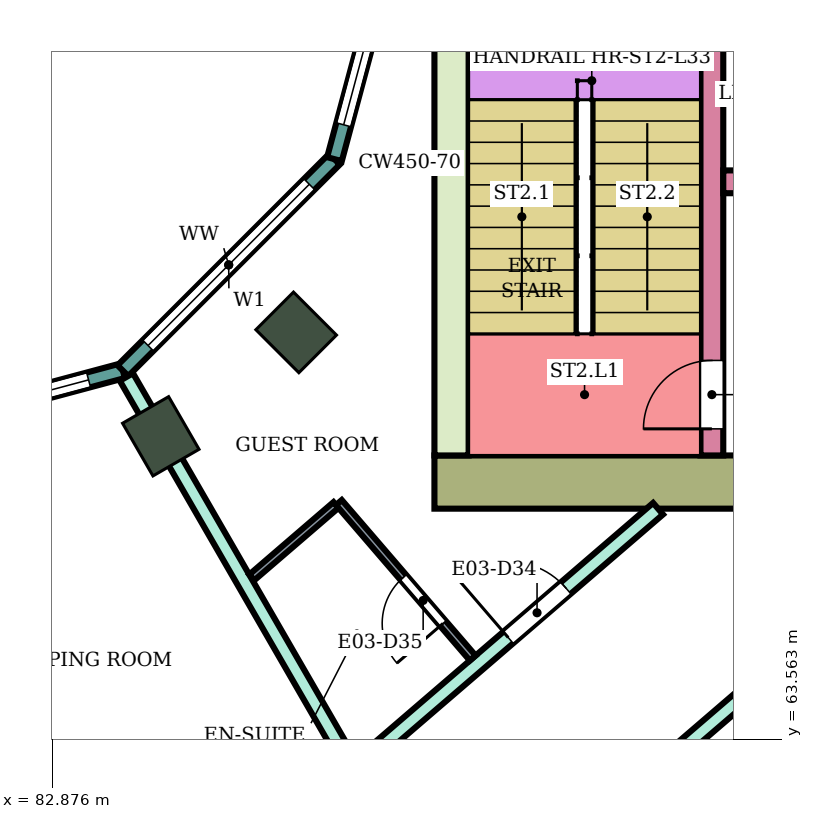
"""IFC4 building model, lengths in metres.
Left out: names, types, materials, properties, quantities, classifications, styles, units other than length and angle.
Written with IfcOpenShell. Run it as: python <this file> out.ifc"""

import sys

from ifc_helpers import new_model, si_unit, direction, frame, frame_2d, origin, origin_2d, place, context, subcontext, project, spatial, rectangle, extrude, element, fill, save


model = new_model("IFC4")
c1 = context("Model", 3, precision=1e-05, world=origin(), true_north=direction((0.0, 1.0)))
c2 = subcontext(c1, "Body", "Model", "MODEL_VIEW")
j1 = project(units=[si_unit("LENGTHUNIT", "METRE"), si_unit("PLANEANGLEUNIT", "RADIAN")], contexts=[c1])
p1 = place(None, origin())
s1 = spatial("IfcSite", under=j1, at=p1, CompositionType="ELEMENT")
p2 = place(p1, origin())
s2 = spatial("IfcBuilding", under=s1, at=p2, CompositionType="ELEMENT")
p3 = place(p2, frame((0.0, 0.0, 141.9)))
s3 = spatial("IfcBuildingStorey", under=s2, at=p3, CompositionType="ELEMENT", Elevation=141.9)
for number, where, z_axis, x_axis in (
    (1, (84.3, 67.552, 0.0), (0.0, 0.0, 1.0), (0.5, -0.866, 0.0)),
    (2, (86.081, 68.919, 0.0), (0.0, 0.0, 1.0), (0.707, -0.707, 0.0)),
):
    element("IfcColumn", number, at=place(p3, frame(where, z_axis=z_axis, x_axis=x_axis)), inside=s3, PredefinedType="COLUMN", context=c2, shape_type="SweptSolid", body=[
        extrude(rectangle(XDim=0.8, YDim=0.7, at=origin_2d()), origin(), (0.0, 0.0, 1.0), 3.9),
    ])
p4 = place(p3, frame((87.9, 66.95, 0.0), z_axis=(0.0, 0.0, 1.0), x_axis=(1.0, 0.0, 0.0)))
e3 = element("IfcWall", 3, at=p4, inside=s3, PredefinedType="SHEAR", context=c2, shape_type="SweptSolid", body=[
    extrude(rectangle(XDim=14.8, YDim=0.7, at=frame_2d((7.4, 0.0))), origin(), (0.0, 0.0, 1.0), 3.58),
])
p5 = place(p4, frame((4.2, 0.0, 0.0)))
e4 = element("IfcOpeningElement", 4, at=p5, cuts=e3, PredefinedType="OPENING", context=c2, shape_type="SweptSolid", body=[
    extrude(rectangle(XDim=2.4, YDim=2.4, at=frame_2d((1.2, 1.2))), frame((0.0, 0.36, 0.0), z_axis=(0.0, -1.0, 0.0), x_axis=(1.0, 0.0, 0.0)), (0.0, 0.0, 1.0), 0.72),
])
p6 = place(p3, frame((88.125, 67.3, 0.0), z_axis=(0.0, 0.0, 1.0), x_axis=(0.0, 1.0, 0.0)))
e5 = element("IfcWall", 5, at=p6, inside=s3, PredefinedType="SHEAR", context=c2, shape_type="SweptSolid", body=[
    extrude(rectangle(XDim=7.7, YDim=0.45, at=frame_2d((3.85, 0.0))), origin(), (0.0, 0.0, 1.0), 3.58),
])
p7 = place(p3, frame((91.55, 67.3, 0.0), z_axis=(0.0, 0.0, 1.0), x_axis=(0.0, 1.0, 0.0)))
e6 = element("IfcWall", 6, at=p7, inside=s3, PredefinedType="SHEAR", context=c2, shape_type="SweptSolid", body=[
    extrude(rectangle(XDim=7.7, YDim=0.3, at=frame_2d((3.85, 0.0))), origin(), (0.0, 0.0, 1.0), 3.58),
])
p8 = place(p7, frame((0.35, 0.0, 0.0)))
e7 = element("IfcOpeningElement", 7, at=p8, cuts=e6, PredefinedType="OPENING", context=c2, shape_type="SweptSolid", body=[
    extrude(rectangle(XDim=0.9, YDim=2.1, at=frame_2d((0.45, 1.05))), frame((0.0, 0.16, 0.0), z_axis=(0.0, -1.0, 0.0), x_axis=(1.0, 0.0, 0.0)), (0.0, 0.0, 1.0), 0.32),
])
p9 = place(p3, frame((91.7, 70.9, 0.0), z_axis=(0.0, 0.0, 1.0), x_axis=(1.0, 0.0, 0.0)))
e8 = element("IfcWall", 8, at=p9, inside=s3, PredefinedType="SHEAR", context=c2, shape_type="SweptSolid", body=[
    extrude(rectangle(XDim=11.0, YDim=0.3, at=frame_2d((5.5, 0.0))), origin(), (0.0, 0.0, 1.0), 3.58),
])
p10 = place(p9, frame((0.4, 0.0, 0.0)))
e9 = element("IfcOpeningElement", 9, at=p10, cuts=e8, PredefinedType="OPENING", context=c2, shape_type="SweptSolid", body=[
    extrude(rectangle(XDim=1.4, YDim=2.1, at=frame_2d((0.7, 1.05))), frame((0.0, 0.16, 0.0), z_axis=(0.0, -1.0, 0.0), x_axis=(1.0, 0.0, 0.0)), (0.0, 0.0, 1.0), 0.32),
])
p11 = place(p9, frame((5.4, 0.0, 0.0)))
e10 = element("IfcOpeningElement", 10, at=p11, cuts=e8, PredefinedType="OPENING", context=c2, shape_type="SweptSolid", body=[
    extrude(rectangle(XDim=1.4, YDim=2.1, at=frame_2d((0.7, 1.05))), frame((0.0, 0.16, 0.0), z_axis=(0.0, -1.0, 0.0), x_axis=(1.0, 0.0, 0.0)), (0.0, 0.0, 1.0), 0.32),
])
p12 = place(p9, frame((8.1, 0.0, 0.0)))
e11 = element("IfcOpeningElement", 11, at=p12, cuts=e8, PredefinedType="OPENING", context=c2, shape_type="SweptSolid", body=[
    extrude(rectangle(XDim=1.0, YDim=2.1, at=frame_2d((0.5, 1.05))), frame((0.0, 0.16, 0.0), z_axis=(0.0, -1.0, 0.0), x_axis=(1.0, 0.0, 0.0)), (0.0, 0.0, 1.0), 0.32),
])
p13 = place(p3, frame((80.0, 67.396, 0.0), z_axis=(0.0, 0.0, 1.0), x_axis=(0.965933654434, 0.258789828301, 0.0)))
e12 = element("IfcWall", 12, at=p13, inside=s3, PredefinedType="NOTDEFINED", context=c2, shape_type="SweptSolid", body=[
    extrude(rectangle(XDim=3.936, YDim=0.2, at=frame_2d((1.968, 0.0))), origin(), (0.0, 0.0, 1.0), 3.9),
])
p14 = place(p13, frame((0.468, 0.0, 0.9)))
e13 = element("IfcOpeningElement", 13, at=p14, cuts=e12, PredefinedType="OPENING", context=c2, shape_type="SweptSolid", body=[
    extrude(rectangle(XDim=3.0, YDim=2.3, at=frame_2d((1.5, 1.15))), frame((0.0, 0.11, 0.0), z_axis=(0.0, -1.0, 0.0), x_axis=(1.0, 0.0, 0.0)), (0.0, 0.0, 1.0), 0.22),
])
p15 = place(p3, frame((83.802, 68.415, 0.0), z_axis=(0.0, 0.0, 1.0), x_axis=(0.707106781187, 0.707106781187, 0.0)))
e14 = element("IfcWall", 14, at=p15, inside=s3, PredefinedType="NOTDEFINED", context=c2, shape_type="SweptSolid", body=[
    extrude(rectangle(XDim=3.936, YDim=0.2, at=frame_2d((1.968, 0.0))), origin(), (0.0, 0.0, 1.0), 3.9),
])
p16 = place(p15, frame((0.468, 0.0, 0.9)))
e15 = element("IfcOpeningElement", 15, at=p16, cuts=e14, PredefinedType="OPENING", context=c2, shape_type="SweptSolid", body=[
    extrude(rectangle(XDim=3.0, YDim=2.3, at=frame_2d((1.5, 1.15))), frame((0.0, 0.11, 0.0), z_axis=(0.0, -1.0, 0.0), x_axis=(1.0, 0.0, 0.0)), (0.0, 0.0, 1.0), 0.22),
])
p17 = place(p3, frame((86.585, 71.198, 0.0), z_axis=(0.0, 0.0, 1.0), x_axis=(0.258789828301, 0.965933654434, 0.0)))
e16 = element("IfcWall", 16, at=p17, inside=s3, PredefinedType="NOTDEFINED", context=c2, shape_type="SweptSolid", body=[
    extrude(rectangle(XDim=3.936, YDim=0.2, at=frame_2d((1.968, 0.0))), origin(), (0.0, 0.0, 1.0), 3.9),
])
p18 = place(p17, frame((0.468, 0.0, 0.9)))
e17 = element("IfcOpeningElement", 17, at=p18, cuts=e16, PredefinedType="OPENING", context=c2, shape_type="SweptSolid", body=[
    extrude(rectangle(XDim=3.0, YDim=2.3, at=frame_2d((1.5, 1.15))), frame((0.0, 0.11, 0.0), z_axis=(0.0, -1.0, 0.0), x_axis=(1.0, 0.0, 0.0)), (0.0, 0.0, 1.0), 0.22),
])
p19 = place(p3, frame((83.847, 68.332, 0.0), z_axis=(0.0, 0.0, 1.0), x_axis=(0.499901724708, -0.866082135617, 0.0)))
e18 = element("IfcWall", 18, at=p19, inside=s3, PredefinedType="PARTITIONING", context=c2, shape_type="SweptSolid", body=[
    extrude(rectangle(XDim=5.855, YDim=0.2, at=frame_2d((2.928, 0.0))), origin(), (0.0, 0.0, 1.0), 3.45),
])
p20 = place(p3, frame((86.877, 63.189, 0.0), z_axis=(0.0, 0.0, 1.0), x_axis=(0.758164888471, 0.652062881853, 0.0)))
e19 = element("IfcWall", 19, at=p20, inside=s3, PredefinedType="PARTITIONING", context=c2, shape_type="SweptSolid", body=[
    extrude(rectangle(XDim=5.23, YDim=0.2, at=frame_2d((2.615, 0.0))), origin(), (0.0, 0.0, 1.0), 3.45),
])
p21 = place(p20, frame((2.63, 0.0, 0.0)))
e20 = element("IfcOpeningElement", 20, at=p21, cuts=e19, PredefinedType="OPENING", context=c2, shape_type="SweptSolid", body=[
    extrude(rectangle(XDim=1.0, YDim=2.1, at=frame_2d((0.5, 1.05))), frame((0.0, 0.11, 0.0), z_axis=(0.0, -1.0, 0.0), x_axis=(1.0, 0.0, 0.0)), (0.0, 0.0, 1.0), 0.22),
])
p22 = place(p3, frame((88.123, 60.831, 0.0), z_axis=(0.0, 0.0, 1.0), x_axis=(0.758118199374, 0.652117164149, 0.0)))
e21 = element("IfcWall", 21, at=p22, inside=s3, PredefinedType="PARTITIONING", context=c2, shape_type="SweptSolid", body=[
    extrude(rectangle(XDim=6.486, YDim=0.2, at=frame_2d((3.243, 0.0))), origin(), (0.0, 0.0, 1.0), 3.45),
])
p23 = place(p22, frame((2.073, 0.0, 0.0)))
e22 = element("IfcOpeningElement", 22, at=p23, cuts=e21, PredefinedType="OPENING", context=c2, shape_type="SweptSolid", body=[
    extrude(rectangle(XDim=1.8, YDim=2.1, at=frame_2d((0.9, 1.05))), frame((0.0, 0.11, 0.0), z_axis=(0.0, -1.0, 0.0), x_axis=(1.0, 0.0, 0.0)), (0.0, 0.0, 1.0), 0.22),
])
p24 = place(p3, frame((85.497, 65.696, 0.0), z_axis=(0.0, 0.0, 1.0), x_axis=(0.75817032582, 0.652056559698, 0.0)))
e23 = element("IfcWall", 23, at=p24, inside=s3, PredefinedType="PARTITIONING", context=c2, shape_type="SweptSolid", body=[
    extrude(rectangle(XDim=1.461, YDim=0.1, at=frame_2d((0.73, 0.0))), origin(), (0.0, 0.0, 1.0), 3.45),
])
p25 = place(p3, frame((86.643, 66.681, 0.0), z_axis=(0.0, 0.0, 1.0), x_axis=(0.652264876065, -0.757991115682, 0.0)))
e24 = element("IfcWall", 24, at=p25, inside=s3, PredefinedType="PARTITIONING", context=c2, shape_type="SweptSolid", body=[
    extrude(rectangle(XDim=2.699, YDim=0.1, at=frame_2d((1.35, 0.0))), origin(), (0.0, 0.0, 1.0), 3.45),
])
p26 = place(p25, frame((1.3, 0.0, 0.0)))
e25 = element("IfcOpeningElement", 25, at=p26, cuts=e24, PredefinedType="OPENING", context=c2, shape_type="SweptSolid", body=[
    extrude(rectangle(XDim=0.8, YDim=2.1, at=frame_2d((0.4, 1.05))), frame((0.0, 0.06, 0.0), z_axis=(0.0, -1.0, 0.0), x_axis=(1.0, 0.0, 0.0)), (0.0, 0.0, 1.0), 0.12),
])
p27 = place(p14, origin())
e26 = element("IfcWindow", 26, at=p27, inside=s3, PartitioningType="SINGLE_PANEL", PredefinedType="WINDOW", context=c2, shape_type="SweptSolid", body=[
    extrude(rectangle(XDim=3.0, YDim=2.3, at=frame_2d((1.5, 1.15))), frame((0.0, 0.03, 0.0), z_axis=(0.0, -1.0, 0.0), x_axis=(1.0, 0.0, 0.0)), (0.0, 0.0, 1.0), 0.06),
])
fill(e13, e26)
p28 = place(p16, origin())
e27 = element("IfcWindow", 27, at=p28, inside=s3, PartitioningType="SINGLE_PANEL", PredefinedType="WINDOW", context=c2, shape_type="SweptSolid", body=[
    extrude(rectangle(XDim=3.0, YDim=2.3, at=frame_2d((1.5, 1.15))), frame((0.0, 0.03, 0.0), z_axis=(0.0, -1.0, 0.0), x_axis=(1.0, 0.0, 0.0)), (0.0, 0.0, 1.0), 0.06),
])
fill(e15, e27)
p29 = place(p18, origin())
e28 = element("IfcWindow", 28, at=p29, inside=s3, PartitioningType="SINGLE_PANEL", PredefinedType="WINDOW", context=c2, shape_type="SweptSolid", body=[
    extrude(rectangle(XDim=3.0, YDim=2.3, at=frame_2d((1.5, 1.15))), frame((0.0, 0.03, 0.0), z_axis=(0.0, -1.0, 0.0), x_axis=(1.0, 0.0, 0.0)), (0.0, 0.0, 1.0), 0.06),
])
fill(e17, e28)
p30 = place(p21, origin())
e29 = element("IfcDoor", 29, at=p30, inside=s3, OperationType="SINGLE_SWING_LEFT", PredefinedType="DOOR", context=c2, shape_type="SweptSolid", body=[
    extrude(rectangle(XDim=1.0, YDim=2.1, at=frame_2d((0.5, 1.05))), frame((0.0, 0.025, 0.0), z_axis=(0.0, -1.0, 0.0), x_axis=(1.0, 0.0, 0.0)), (0.0, 0.0, 1.0), 0.05),
])
fill(e20, e29)
p31 = place(p26, frame((0.8, 0.0, 0.0), z_axis=(0.0, 0.0, 1.0), x_axis=(-1.0, 0.0, 0.0)))
e30 = element("IfcDoor", 30, at=p31, inside=s3, OperationType="SINGLE_SWING_LEFT", PredefinedType="DOOR", context=c2, shape_type="SweptSolid", body=[
    extrude(rectangle(XDim=0.8, YDim=2.1, at=frame_2d((0.4, 1.05))), frame((0.0, 0.025, 0.0), z_axis=(0.0, -1.0, 0.0), x_axis=(1.0, 0.0, 0.0)), (0.0, 0.0, 1.0), 0.05),
])
fill(e25, e30)
p32 = place(p8, origin())
e31 = element("IfcDoor", 31, at=p32, inside=s3, OperationType="SINGLE_SWING_LEFT", PredefinedType="DOOR", context=c2, shape_type="SweptSolid", body=[
    extrude(rectangle(XDim=0.9, YDim=2.1, at=frame_2d((0.45, 1.05))), frame((0.0, 0.025, 0.0), z_axis=(0.0, -1.0, 0.0), x_axis=(1.0, 0.0, 0.0)), (0.0, 0.0, 1.0), 0.05),
])
fill(e7, e31)
save(model, sys.argv[1])
